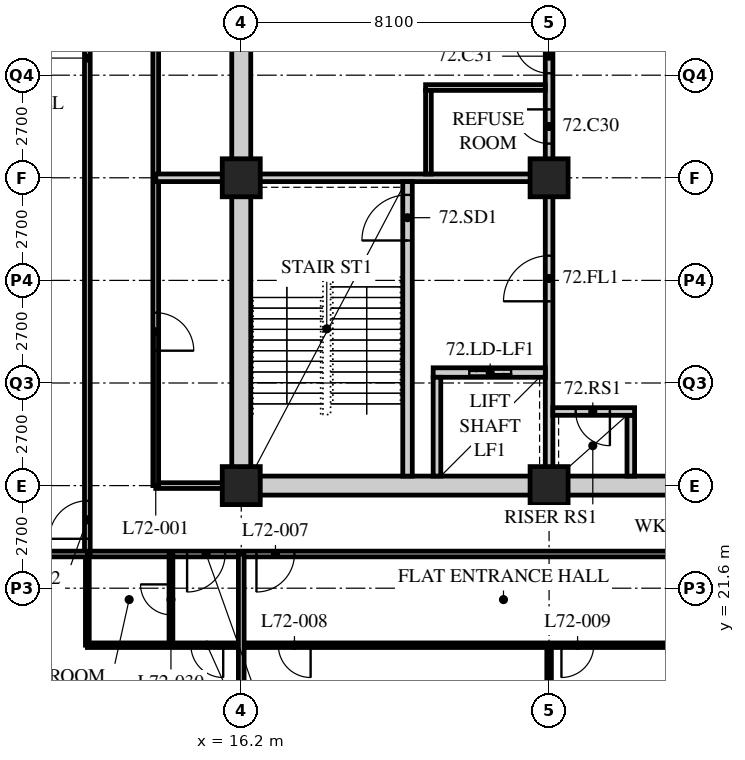
"""IFC4 building model, lengths in metres.
Left out: names, types, materials, properties, quantities, classifications, styles, units other than length and angle.
Written with IfcOpenShell. Run it as: python <this file> out.ifc"""

import sys

from ifc_helpers import new_model, si_unit, direction, frame, frame_2d, origin, origin_2d, place, context, subcontext, project, spatial, rectangle, hollow_rectangle, extrude, element, fill, save


model = new_model("IFC4")
c1 = context("Model", 3, precision=1e-05, world=origin(), true_north=direction((0.0, 1.0)))
c2 = subcontext(c1, "Body", "Model", "MODEL_VIEW")
j1 = project(units=[si_unit("LENGTHUNIT", "METRE"), si_unit("PLANEANGLEUNIT", "RADIAN")], contexts=[c1])
p1 = place(None, origin())
s1 = spatial("IfcSite", under=j1, at=p1, CompositionType="ELEMENT")
p2 = place(p1, origin())
s2 = spatial("IfcBuilding", under=s1, at=p2, CompositionType="ELEMENT")
p3 = place(p2, frame((0.0, 0.0, 281.4)))
s3 = spatial("IfcBuildingStorey", under=s2, at=p3, CompositionType="ELEMENT", Elevation=281.4)
for number, where, z_axis, x_axis in (
    (1, (16.2, 24.3, 0.0), (0.0, 0.0, 1.0), (1.0, 0.0, 0.0)),
    (2, (16.2, 32.4, 0.0), (0.0, 0.0, 1.0), (1.0, 0.0, 0.0)),
    (3, (24.3, 24.3, 0.0), (0.0, 0.0, 1.0), (1.0, 0.0, 0.0)),
    (4, (24.3, 32.4, 0.0), (0.0, 0.0, 1.0), (1.0, 0.0, 0.0)),
):
    element("IfcColumn", number, at=place(p3, frame(where, z_axis=z_axis, x_axis=x_axis)), inside=s3, PredefinedType="COLUMN", context=c2, shape_type="SweptSolid", body=[
        extrude(hollow_rectangle(XDim=1.0, YDim=1.0, WallThickness=0.1, at=origin_2d()), origin(), (0.0, 0.0, 1.0), 3.9),
    ])
p4 = place(p3, frame((12.15, 22.5, 0.0), z_axis=(0.0, 0.0, 1.0), x_axis=(1.0, 0.0, 0.0)))
e5 = element("IfcWall", 5, at=p4, inside=s3, PredefinedType="PARTITIONING", context=c2, shape_type="SweptSolid", body=[
    extrude(rectangle(XDim=24.3, YDim=0.15, at=frame_2d((12.15, 0.0))), origin(), (0.0, 0.0, 1.0), 3.69),
])
p5 = place(p4, frame((4.45, 0.0, 0.0)))
e6 = element("IfcOpeningElement", 6, at=p5, cuts=e5, PredefinedType="OPENING", context=c2, shape_type="SweptSolid", body=[
    extrude(rectangle(XDim=1.0, YDim=2.1, at=frame_2d((0.5, 1.05))), frame((0.0, 0.085, 0.0), z_axis=(0.0, -1.0, 0.0), x_axis=(1.0, 0.0, 0.0)), (0.0, 0.0, 1.0), 0.17),
])
p6 = place(p4, frame((22.6, 0.0, 0.0)))
e7 = element("IfcOpeningElement", 7, at=p6, cuts=e5, PredefinedType="OPENING", context=c2, shape_type="SweptSolid", body=[
    extrude(rectangle(XDim=1.0, YDim=2.1, at=frame_2d((0.5, 1.05))), frame((0.0, 0.085, 0.0), z_axis=(0.0, -1.0, 0.0), x_axis=(1.0, 0.0, 0.0)), (0.0, 0.0, 1.0), 0.17),
])
p7 = place(p4, frame((2.625, 0.0, 0.0)))
e8 = element("IfcOpeningElement", 8, at=p7, cuts=e5, PredefinedType="OPENING", context=c2, shape_type="SweptSolid", body=[
    extrude(rectangle(XDim=1.0, YDim=2.1, at=frame_2d((0.5, 1.05))), frame((0.0, 0.085, 0.0), z_axis=(0.0, -1.0, 0.0), x_axis=(1.0, 0.0, 0.0)), (0.0, 0.0, 1.0), 0.17),
])
p8 = place(p3, frame((12.15, 22.5, 0.0), z_axis=(0.0, 0.0, 1.0), x_axis=(0.0, 1.0, 0.0)))
e9 = element("IfcWall", 9, at=p8, inside=s3, PredefinedType="PARTITIONING", context=c2, shape_type="SweptSolid", body=[
    extrude(rectangle(XDim=26.1, YDim=0.15, at=frame_2d((13.05, 0.0))), origin(), (0.0, 0.0, 1.0), 3.69),
])
p9 = place(p8, frame((0.4, 0.0, 0.0)))
e10 = element("IfcOpeningElement", 10, at=p9, cuts=e9, PredefinedType="OPENING", context=c2, shape_type="SweptSolid", body=[
    extrude(rectangle(XDim=1.0, YDim=2.1, at=frame_2d((0.5, 1.05))), frame((0.0, 0.085, 0.0), z_axis=(0.0, -1.0, 0.0), x_axis=(1.0, 0.0, 0.0)), (0.0, 0.0, 1.0), 0.17),
])
p10 = place(p3, frame((16.0, 24.3, 0.0), z_axis=(0.0, 0.0, 1.0), x_axis=(-1.0, 0.0, 0.0)))
e11 = element("IfcWall", 11, at=p10, inside=s3, PredefinedType="PARTITIONING", context=c2, shape_type="SweptSolid", body=[
    extrude(rectangle(XDim=2.05, YDim=0.15, at=frame_2d((1.025, 0.0))), origin(), (0.0, 0.0, 1.0), 3.078),
])
p11 = place(p3, frame((13.95, 24.3, 0.0), z_axis=(0.0, 0.0, 1.0), x_axis=(0.0, 1.0, 0.0)))
e12 = element("IfcWall", 12, at=p11, inside=s3, PredefinedType="PARTITIONING", context=c2, shape_type="SweptSolid", body=[
    extrude(rectangle(XDim=22.5, YDim=0.15, at=frame_2d((11.25, 0.0))), origin(), (0.0, 0.0, 1.0), 3.69),
])
p12 = place(p11, frame((3.55, 0.0, 0.0)))
e13 = element("IfcOpeningElement", 13, at=p12, cuts=e12, PredefinedType="OPENING", context=c2, shape_type="SweptSolid", body=[
    extrude(rectangle(XDim=1.0, YDim=2.1, at=frame_2d((0.5, 1.05))), frame((0.0, 0.085, 0.0), z_axis=(0.0, -1.0, 0.0), x_axis=(1.0, 0.0, 0.0)), (0.0, 0.0, 1.0), 0.17),
])
p13 = place(p11, frame((11.65, 0.0, 0.0)))
e14 = element("IfcOpeningElement", 14, at=p13, cuts=e12, PredefinedType="OPENING", context=c2, shape_type="SweptSolid", body=[
    extrude(rectangle(XDim=1.0, YDim=2.1, at=frame_2d((0.5, 1.05))), frame((0.0, 0.085, 0.0), z_axis=(0.0, -1.0, 0.0), x_axis=(1.0, 0.0, 0.0)), (0.0, 0.0, 1.0), 0.17),
])
p14 = place(p3, frame((13.95, 32.4, 0.0), z_axis=(0.0, 0.0, 1.0), x_axis=(1.0, 0.0, 0.0)))
e15 = element("IfcWall", 15, at=p14, inside=s3, PredefinedType="SOLIDWALL", context=c2, shape_type="SweptSolid", body=[
    extrude(rectangle(XDim=2.25, YDim=0.2, at=frame_2d((1.125, 0.0))), origin(), (0.0, 0.0, 1.0), 3.078),
])
p15 = place(p3, frame((24.3, 20.1, 0.0), z_axis=(0.0, 0.0, 1.0), x_axis=(0.0, -1.0, 0.0)))
e16 = element("IfcWall", 16, at=p15, inside=s3, PredefinedType="PARTITIONING", context=c2, shape_type="SweptSolid", body=[
    extrude(rectangle(XDim=3.6, YDim=0.12, at=frame_2d((1.8, 0.0))), origin(), (0.0, 0.0, 1.0), 3.078),
])
p16 = place(p3, frame((12.15, 20.1, 0.0), z_axis=(0.0, 0.0, 1.0), x_axis=(1.0, 0.0, 0.0)))
e17 = element("IfcWall", 17, at=p16, inside=s3, PredefinedType="PARTITIONING", context=c2, shape_type="SweptSolid", body=[
    extrude(rectangle(XDim=20.25, YDim=0.12, at=frame_2d((10.125, 0.0))), origin(), (0.0, 0.0, 1.0), 3.69),
])
p17 = place(p16, frame((5.025, 0.0, 0.0)))
e18 = element("IfcOpeningElement", 18, at=p17, cuts=e17, PredefinedType="OPENING", context=c2, shape_type="SweptSolid", body=[
    extrude(rectangle(XDim=0.85, YDim=2.1, at=frame_2d((0.425, 1.05))), frame((0.0, 0.07, 0.0), z_axis=(0.0, -1.0, 0.0), x_axis=(1.0, 0.0, 0.0)), (0.0, 0.0, 1.0), 0.14),
])
p18 = place(p16, frame((12.475, 0.0, 0.0)))
e19 = element("IfcOpeningElement", 19, at=p18, cuts=e17, PredefinedType="OPENING", context=c2, shape_type="SweptSolid", body=[
    extrude(rectangle(XDim=0.85, YDim=2.1, at=frame_2d((0.425, 1.05))), frame((0.0, 0.07, 0.0), z_axis=(0.0, -1.0, 0.0), x_axis=(1.0, 0.0, 0.0)), (0.0, 0.0, 1.0), 0.14),
])
p19 = place(p16, frame((16.525, 0.0, 0.0)))
e20 = element("IfcOpeningElement", 20, at=p19, cuts=e17, PredefinedType="OPENING", context=c2, shape_type="SweptSolid", body=[
    extrude(rectangle(XDim=0.85, YDim=2.1, at=frame_2d((0.425, 1.05))), frame((0.0, 0.07, 0.0), z_axis=(0.0, -1.0, 0.0), x_axis=(1.0, 0.0, 0.0)), (0.0, 0.0, 1.0), 0.14),
])
p20 = place(p16, frame((2.725, 0.0, 0.0)))
e21 = element("IfcOpeningElement", 21, at=p20, cuts=e17, PredefinedType="OPENING", context=c2, shape_type="SweptSolid", body=[
    extrude(rectangle(XDim=0.85, YDim=2.1, at=frame_2d((0.425, 1.05))), frame((0.0, 0.07, 0.0), z_axis=(0.0, -1.0, 0.0), x_axis=(1.0, 0.0, 0.0)), (0.0, 0.0, 1.0), 0.14),
])
p21 = place(p3, frame((14.35, 22.5, 0.0), z_axis=(0.0, 0.0, 1.0), x_axis=(0.0, -1.0, 0.0)))
e22 = element("IfcWall", 22, at=p21, inside=s3, PredefinedType="PARTITIONING", context=c2, shape_type="SweptSolid", body=[
    extrude(rectangle(XDim=2.4, YDim=0.1, at=frame_2d((1.2, 0.0))), origin(), (0.0, 0.0, 1.0), 3.69),
])
p22 = place(p21, frame((0.8, 0.0, 0.0)))
e23 = element("IfcOpeningElement", 23, at=p22, cuts=e22, PredefinedType="OPENING", context=c2, shape_type="SweptSolid", body=[
    extrude(rectangle(XDim=0.8, YDim=2.1, at=frame_2d((0.4, 1.05))), frame((0.0, 0.06, 0.0), z_axis=(0.0, -1.0, 0.0), x_axis=(1.0, 0.0, 0.0)), (0.0, 0.0, 1.0), 0.12),
])
p23 = place(p3, frame((12.15, 22.5, 0.0), z_axis=(0.0, 0.0, 1.0), x_axis=(0.0, -1.0, 0.0)))
e24 = element("IfcWall", 24, at=p23, inside=s3, PredefinedType="PARTITIONING", context=c2, shape_type="SweptSolid", body=[
    extrude(rectangle(XDim=2.4, YDim=0.1, at=frame_2d((1.2, 0.0))), origin(), (0.0, 0.0, 1.0), 3.69),
])
p24 = place(p3, frame((4.35, 22.5, 0.0), z_axis=(0.0, 0.0, 1.0), x_axis=(1.0, 0.0, 0.0)))
e25 = element("IfcWall", 25, at=p24, inside=s3, PredefinedType="PARTITIONING", context=c2, shape_type="SweptSolid", body=[
    extrude(rectangle(XDim=7.8, YDim=0.15, at=frame_2d((3.9, 0.0))), origin(), (0.0, 0.0, 1.0), 3.69),
])
p25 = place(p3, frame((16.2, 22.5, 0.0), z_axis=(0.0, 0.0, 1.0), x_axis=(0.0, -1.0, 0.0)))
e26 = element("IfcWall", 26, at=p25, inside=s3, PredefinedType="PARTITIONING", context=c2, shape_type="SweptSolid", body=[
    extrude(rectangle(XDim=6.0, YDim=0.15, at=frame_2d((3.0, 0.0))), origin(), (0.0, 0.0, 1.0), 3.078),
])
p26 = place(p3, frame((15.95, 24.3, 0.0), z_axis=(0.0, 0.0, 1.0), x_axis=(1.0, 0.0, 0.0)))
e27 = element("IfcWall", 27, at=p26, inside=s3, PredefinedType="SOLIDWALL", context=c2, shape_type="SweptSolid", body=[
    extrude(rectangle(XDim=24.55, YDim=0.5, at=frame_2d((12.275, 0.0))), origin(), (0.0, 0.0, 1.0), 3.04),
])
p27 = place(p26, frame((11.5, 0.0, 0.0)))
e28 = element("IfcOpeningElement", 28, at=p27, cuts=e27, PredefinedType="OPENING", context=c2, shape_type="SweptSolid", body=[
    extrude(rectangle(XDim=1.8, YDim=2.4, at=frame_2d((0.9, 1.2))), frame((0.0, 0.26, 0.0), z_axis=(0.0, -1.0, 0.0), x_axis=(1.0, 0.0, 0.0)), (0.0, 0.0, 1.0), 0.52),
])
p28 = place(p3, frame((16.2, 24.55, 0.0), z_axis=(0.0, 0.0, 1.0), x_axis=(0.0, 1.0, 0.0)))
e29 = element("IfcWall", 29, at=p28, inside=s3, PredefinedType="SOLIDWALL", context=c2, shape_type="SweptSolid", body=[
    extrude(rectangle(XDim=15.7, YDim=0.5, at=frame_2d((7.85, 0.0))), origin(), (0.0, 0.0, 1.0), 3.078),
])
p29 = place(p3, frame((16.45, 32.4, 0.0), z_axis=(0.0, 0.0, 1.0), x_axis=(1.0, 0.0, 0.0)))
e30 = element("IfcWall", 30, at=p29, inside=s3, PredefinedType="SOLIDWALL", context=c2, shape_type="SweptSolid", body=[
    extrude(rectangle(XDim=7.95, YDim=0.2, at=frame_2d((3.975, 0.0))), origin(), (0.0, 0.0, 1.0), 3.078),
])
p30 = place(p3, frame((24.3, 24.55, 0.0), z_axis=(0.0, 0.0, 1.0), x_axis=(0.0, 1.0, 0.0)))
e31 = element("IfcWall", 31, at=p30, inside=s3, PredefinedType="SOLIDWALL", context=c2, shape_type="SweptSolid", body=[
    extrude(rectangle(XDim=7.75, YDim=0.2, at=frame_2d((3.875, 0.0))), origin(), (0.0, 0.0, 1.0), 3.078),
])
p31 = place(p30, frame((4.6, 0.0, 0.0)))
e32 = element("IfcOpeningElement", 32, at=p31, cuts=e31, PredefinedType="OPENING", context=c2, shape_type="SweptSolid", body=[
    extrude(rectangle(XDim=1.2, YDim=2.1, at=frame_2d((0.6, 1.05))), frame((0.0, 0.11, 0.0), z_axis=(0.0, -1.0, 0.0), x_axis=(1.0, 0.0, 0.0)), (0.0, 0.0, 1.0), 0.22),
])
p32 = place(p3, frame((20.575, 24.55, 0.0), z_axis=(0.0, 0.0, 1.0), x_axis=(0.0, 1.0, 0.0)))
e33 = element("IfcWall", 33, at=p32, inside=s3, PredefinedType="SOLIDWALL", context=c2, shape_type="SweptSolid", body=[
    extrude(rectangle(XDim=7.75, YDim=0.25, at=frame_2d((3.875, 0.0))), origin(), (0.0, 0.0, 1.0), 3.69),
])
p33 = place(p32, frame((6.2, 0.0, 0.0)))
e34 = element("IfcOpeningElement", 34, at=p33, cuts=e33, PredefinedType="OPENING", context=c2, shape_type="SweptSolid", body=[
    extrude(rectangle(XDim=1.2, YDim=2.1, at=frame_2d((0.6, 1.05))), frame((0.0, 0.135, 0.0), z_axis=(0.0, -1.0, 0.0), x_axis=(1.0, 0.0, 0.0)), (0.0, 0.0, 1.0), 0.27),
])
p34 = place(p3, frame((21.25, 27.275, 0.0), z_axis=(0.0, 0.0, 1.0), x_axis=(1.0, 0.0, 0.0)))
e35 = element("IfcWall", 35, at=p34, inside=s3, PredefinedType="SOLIDWALL", context=c2, shape_type="SweptSolid", body=[
    extrude(rectangle(XDim=2.95, YDim=0.25, at=frame_2d((1.475, 0.0))), origin(), (0.0, 0.0, 1.0), 3.69),
])
p35 = place(p34, frame((0.95, 0.0, 0.0)))
e36 = element("IfcOpeningElement", 36, at=p35, cuts=e35, PredefinedType="OPENING", context=c2, shape_type="SweptSolid", body=[
    extrude(rectangle(XDim=1.1, YDim=2.4, at=frame_2d((0.55, 1.2))), frame((0.0, 0.135, 0.0), z_axis=(0.0, -1.0, 0.0), x_axis=(1.0, 0.0, 0.0)), (0.0, 0.0, 1.0), 0.27),
])
p36 = place(p3, frame((21.35, 24.55, 0.0), z_axis=(0.0, 0.0, 1.0), x_axis=(0.0, 1.0, 0.0)))
e37 = element("IfcWall", 37, at=p36, inside=s3, PredefinedType="SOLIDWALL", context=c2, shape_type="SweptSolid", body=[
    extrude(rectangle(XDim=2.6, YDim=0.2, at=frame_2d((1.3, 0.0))), origin(), (0.0, 0.0, 1.0), 3.69),
])
p37 = place(p3, frame((26.45, 24.55, 0.0), z_axis=(0.0, 0.0, 1.0), x_axis=(0.0, 1.0, 0.0)))
e38 = element("IfcWall", 38, at=p37, inside=s3, PredefinedType="SOLIDWALL", context=c2, shape_type="SweptSolid", body=[
    extrude(rectangle(XDim=1.6, YDim=0.2, at=frame_2d((0.8, 0.0))), origin(), (0.0, 0.0, 1.0), 3.69),
])
p38 = place(p3, frame((24.4, 26.25, 0.0), z_axis=(0.0, 0.0, 1.0), x_axis=(1.0, 0.0, 0.0)))
e39 = element("IfcWall", 39, at=p38, inside=s3, PredefinedType="SOLIDWALL", context=c2, shape_type="SweptSolid", body=[
    extrude(rectangle(XDim=2.15, YDim=0.2, at=frame_2d((1.075, 0.0))), origin(), (0.0, 0.0, 1.0), 3.69),
])
p39 = place(p38, frame((0.6, 0.0, 0.0)))
e40 = element("IfcOpeningElement", 40, at=p39, cuts=e39, PredefinedType="OPENING", context=c2, shape_type="SweptSolid", body=[
    extrude(rectangle(XDim=0.9, YDim=2.1, at=frame_2d((0.45, 1.05))), frame((0.0, 0.11, 0.0), z_axis=(0.0, -1.0, 0.0), x_axis=(1.0, 0.0, 0.0)), (0.0, 0.0, 1.0), 0.22),
])
p40 = place(p3, frame((24.3, 32.5, 0.0), z_axis=(0.0, 0.0, 1.0), x_axis=(0.0, 1.0, 0.0)))
e41 = element("IfcWall", 41, at=p40, inside=s3, PredefinedType="PARTITIONING", context=c2, shape_type="SweptSolid", body=[
    extrude(rectangle(XDim=7.75, YDim=0.2, at=frame_2d((3.875, 0.0))), origin(), (0.0, 0.0, 1.0), 3.078),
])
p41 = place(p40, frame((0.8, 0.0, 0.0)))
e42 = element("IfcOpeningElement", 42, at=p41, cuts=e41, PredefinedType="OPENING", context=c2, shape_type="SweptSolid", body=[
    extrude(rectangle(XDim=0.9, YDim=2.1, at=frame_2d((0.45, 1.05))), frame((0.0, 0.11, 0.0), z_axis=(0.0, -1.0, 0.0), x_axis=(1.0, 0.0, 0.0)), (0.0, 0.0, 1.0), 0.22),
])
p42 = place(p40, frame((2.65, 0.0, 0.0)))
e43 = element("IfcOpeningElement", 43, at=p42, cuts=e41, PredefinedType="OPENING", context=c2, shape_type="SweptSolid", body=[
    extrude(rectangle(XDim=0.9, YDim=2.1, at=frame_2d((0.45, 1.05))), frame((0.0, 0.11, 0.0), z_axis=(0.0, -1.0, 0.0), x_axis=(1.0, 0.0, 0.0)), (0.0, 0.0, 1.0), 0.22),
])
p43 = place(p40, frame((4.3, 0.0, 0.0)))
e44 = element("IfcOpeningElement", 44, at=p43, cuts=e41, PredefinedType="OPENING", context=c2, shape_type="SweptSolid", body=[
    extrude(rectangle(XDim=0.9, YDim=2.1, at=frame_2d((0.45, 1.05))), frame((0.0, 0.11, 0.0), z_axis=(0.0, -1.0, 0.0), x_axis=(1.0, 0.0, 0.0)), (0.0, 0.0, 1.0), 0.22),
])
p44 = place(p40, frame((6.2, 0.0, 0.0)))
e45 = element("IfcOpeningElement", 45, at=p44, cuts=e41, PredefinedType="OPENING", context=c2, shape_type="SweptSolid", body=[
    extrude(rectangle(XDim=0.9, YDim=2.1, at=frame_2d((0.45, 1.05))), frame((0.0, 0.11, 0.0), z_axis=(0.0, -1.0, 0.0), x_axis=(1.0, 0.0, 0.0)), (0.0, 0.0, 1.0), 0.22),
])
p45 = place(p3, frame((21.05, 34.775, 0.0), z_axis=(0.0, 0.0, 1.0), x_axis=(1.0, 0.0, 0.0)))
e46 = element("IfcWall", 46, at=p45, inside=s3, PredefinedType="PARTITIONING", context=c2, shape_type="SweptSolid", body=[
    extrude(rectangle(XDim=3.15, YDim=0.15, at=frame_2d((1.575, 0.0))), origin(), (0.0, 0.0, 1.0), 3.69),
])
p46 = place(p3, frame((21.125, 32.5, 0.0), z_axis=(0.0, 0.0, 1.0), x_axis=(0.0, 1.0, 0.0)))
e47 = element("IfcWall", 47, at=p46, inside=s3, PredefinedType="PARTITIONING", context=c2, shape_type="SweptSolid", body=[
    extrude(rectangle(XDim=2.2, YDim=0.15, at=frame_2d((1.1, 0.0))), origin(), (0.0, 0.0, 1.0), 3.69),
])
p47 = place(p12, origin())
e48 = element("IfcDoor", 48, at=p47, inside=s3, OperationType="SINGLE_SWING_RIGHT", PredefinedType="DOOR", context=c2, shape_type="SweptSolid", body=[
    extrude(rectangle(XDim=1.0, YDim=2.1, at=frame_2d((0.5, 1.05))), frame((0.0, 0.025, 0.0), z_axis=(0.0, -1.0, 0.0), x_axis=(1.0, 0.0, 0.0)), (0.0, 0.0, 1.0), 0.05),
])
fill(e13, e48)
p48 = place(p5, origin())
e49 = element("IfcDoor", 49, at=p48, inside=s3, OperationType="SINGLE_SWING_RIGHT", PredefinedType="DOOR", context=c2, shape_type="SweptSolid", body=[
    extrude(rectangle(XDim=1.0, YDim=2.1, at=frame_2d((0.5, 1.05))), frame((0.0, 0.025, 0.0), z_axis=(0.0, -1.0, 0.0), x_axis=(1.0, 0.0, 0.0)), (0.0, 0.0, 1.0), 0.05),
])
fill(e6, e49)
p49 = place(p17, origin())
e50 = element("IfcDoor", 50, at=p49, inside=s3, OperationType="SINGLE_SWING_LEFT", PredefinedType="DOOR", context=c2, shape_type="SweptSolid", body=[
    extrude(rectangle(XDim=0.85, YDim=2.1, at=frame_2d((0.425, 1.05))), frame((0.0, 0.025, 0.0), z_axis=(0.0, -1.0, 0.0), x_axis=(1.0, 0.0, 0.0)), (0.0, 0.0, 1.0), 0.05),
])
fill(e18, e50)
p50 = place(p18, origin())
e51 = element("IfcDoor", 51, at=p50, inside=s3, OperationType="SINGLE_SWING_RIGHT", PredefinedType="DOOR", context=c2, shape_type="SweptSolid", body=[
    extrude(rectangle(XDim=0.85, YDim=2.1, at=frame_2d((0.425, 1.05))), frame((0.0, 0.025, 0.0), z_axis=(0.0, -1.0, 0.0), x_axis=(1.0, 0.0, 0.0)), (0.0, 0.0, 1.0), 0.05),
])
fill(e19, e51)
p51 = place(p9, origin())
e52 = element("IfcDoor", 52, at=p51, inside=s3, OperationType="SINGLE_SWING_LEFT", PredefinedType="DOOR", context=c2, shape_type="SweptSolid", body=[
    extrude(rectangle(XDim=1.0, YDim=2.1, at=frame_2d((0.5, 1.05))), frame((0.0, 0.025, 0.0), z_axis=(0.0, -1.0, 0.0), x_axis=(1.0, 0.0, 0.0)), (0.0, 0.0, 1.0), 0.05),
])
fill(e10, e52)
p52 = place(p22, origin())
e53 = element("IfcDoor", 53, at=p52, inside=s3, OperationType="SINGLE_SWING_RIGHT", PredefinedType="DOOR", context=c2, shape_type="SweptSolid", body=[
    extrude(rectangle(XDim=0.8, YDim=2.1, at=frame_2d((0.4, 1.05))), frame((0.0, 0.025, 0.0), z_axis=(0.0, -1.0, 0.0), x_axis=(1.0, 0.0, 0.0)), (0.0, 0.0, 1.0), 0.05),
])
fill(e23, e53)
p53 = place(p7, origin())
e54 = element("IfcDoor", 54, at=p53, inside=s3, OperationType="SINGLE_SWING_RIGHT", PredefinedType="DOOR", context=c2, shape_type="SweptSolid", body=[
    extrude(rectangle(XDim=1.0, YDim=2.1, at=frame_2d((0.5, 1.05))), frame((0.0, 0.025, 0.0), z_axis=(0.0, -1.0, 0.0), x_axis=(1.0, 0.0, 0.0)), (0.0, 0.0, 1.0), 0.05),
])
fill(e8, e54)
p54 = place(p20, origin())
e55 = element("IfcDoor", 55, at=p54, inside=s3, OperationType="SINGLE_SWING_LEFT", PredefinedType="DOOR", context=c2, shape_type="SweptSolid", body=[
    extrude(rectangle(XDim=0.85, YDim=2.1, at=frame_2d((0.425, 1.05))), frame((0.0, 0.025, 0.0), z_axis=(0.0, -1.0, 0.0), x_axis=(1.0, 0.0, 0.0)), (0.0, 0.0, 1.0), 0.05),
])
fill(e21, e55)
p55 = place(p41, origin())
e56 = element("IfcDoor", 56, at=p55, inside=s3, OperationType="SINGLE_SWING_RIGHT", PredefinedType="DOOR", context=c2, shape_type="SweptSolid", body=[
    extrude(rectangle(XDim=0.9, YDim=2.1, at=frame_2d((0.45, 1.05))), frame((0.0, 0.025, 0.0), z_axis=(0.0, -1.0, 0.0), x_axis=(1.0, 0.0, 0.0)), (0.0, 0.0, 1.0), 0.05),
])
fill(e42, e56)
p56 = place(p42, origin())
e57 = element("IfcDoor", 57, at=p56, inside=s3, OperationType="SINGLE_SWING_RIGHT", PredefinedType="DOOR", context=c2, shape_type="SweptSolid", body=[
    extrude(rectangle(XDim=0.9, YDim=2.1, at=frame_2d((0.45, 1.05))), frame((0.0, 0.025, 0.0), z_axis=(0.0, -1.0, 0.0), x_axis=(1.0, 0.0, 0.0)), (0.0, 0.0, 1.0), 0.05),
])
fill(e43, e57)
p57 = place(p33, origin())
e58 = element("IfcDoor", 58, at=p57, inside=s3, OperationType="SINGLE_SWING_LEFT", PredefinedType="DOOR", context=c2, shape_type="SweptSolid", body=[
    extrude(rectangle(XDim=1.2, YDim=2.1, at=frame_2d((0.6, 1.05))), frame((0.0, 0.025, 0.0), z_axis=(0.0, -1.0, 0.0), x_axis=(1.0, 0.0, 0.0)), (0.0, 0.0, 1.0), 0.05),
])
fill(e34, e58)
p58 = place(p31, origin())
e59 = element("IfcDoor", 59, at=p58, inside=s3, OperationType="SINGLE_SWING_LEFT", PredefinedType="DOOR", context=c2, shape_type="SweptSolid", body=[
    extrude(rectangle(XDim=1.2, YDim=2.1, at=frame_2d((0.6, 1.05))), frame((0.0, 0.025, 0.0), z_axis=(0.0, -1.0, 0.0), x_axis=(1.0, 0.0, 0.0)), (0.0, 0.0, 1.0), 0.05),
])
fill(e32, e59)
p59 = place(p39, origin())
e60 = element("IfcDoor", 60, at=p59, inside=s3, OperationType="SINGLE_SWING_LEFT", PredefinedType="DOOR", context=c2, shape_type="SweptSolid", body=[
    extrude(rectangle(XDim=0.9, YDim=2.1, at=frame_2d((0.45, 1.05))), frame((0.0, 0.025, 0.0), z_axis=(0.0, -1.0, 0.0), x_axis=(1.0, 0.0, 0.0)), (0.0, 0.0, 1.0), 0.05),
])
fill(e40, e60)
p60 = place(p35, origin())
e61 = element("IfcDoor", 61, at=p60, inside=s3, OperationType="DOUBLE_DOOR_SLIDING", PredefinedType="DOOR", context=c2, shape_type="SweptSolid", body=[
    extrude(rectangle(XDim=1.1, YDim=2.4, at=frame_2d((0.55, 1.2))), frame((0.0, 0.025, 0.0), z_axis=(0.0, -1.0, 0.0), x_axis=(1.0, 0.0, 0.0)), (0.0, 0.0, 1.0), 0.05),
])
fill(e36, e61)
save(model, sys.argv[1])
